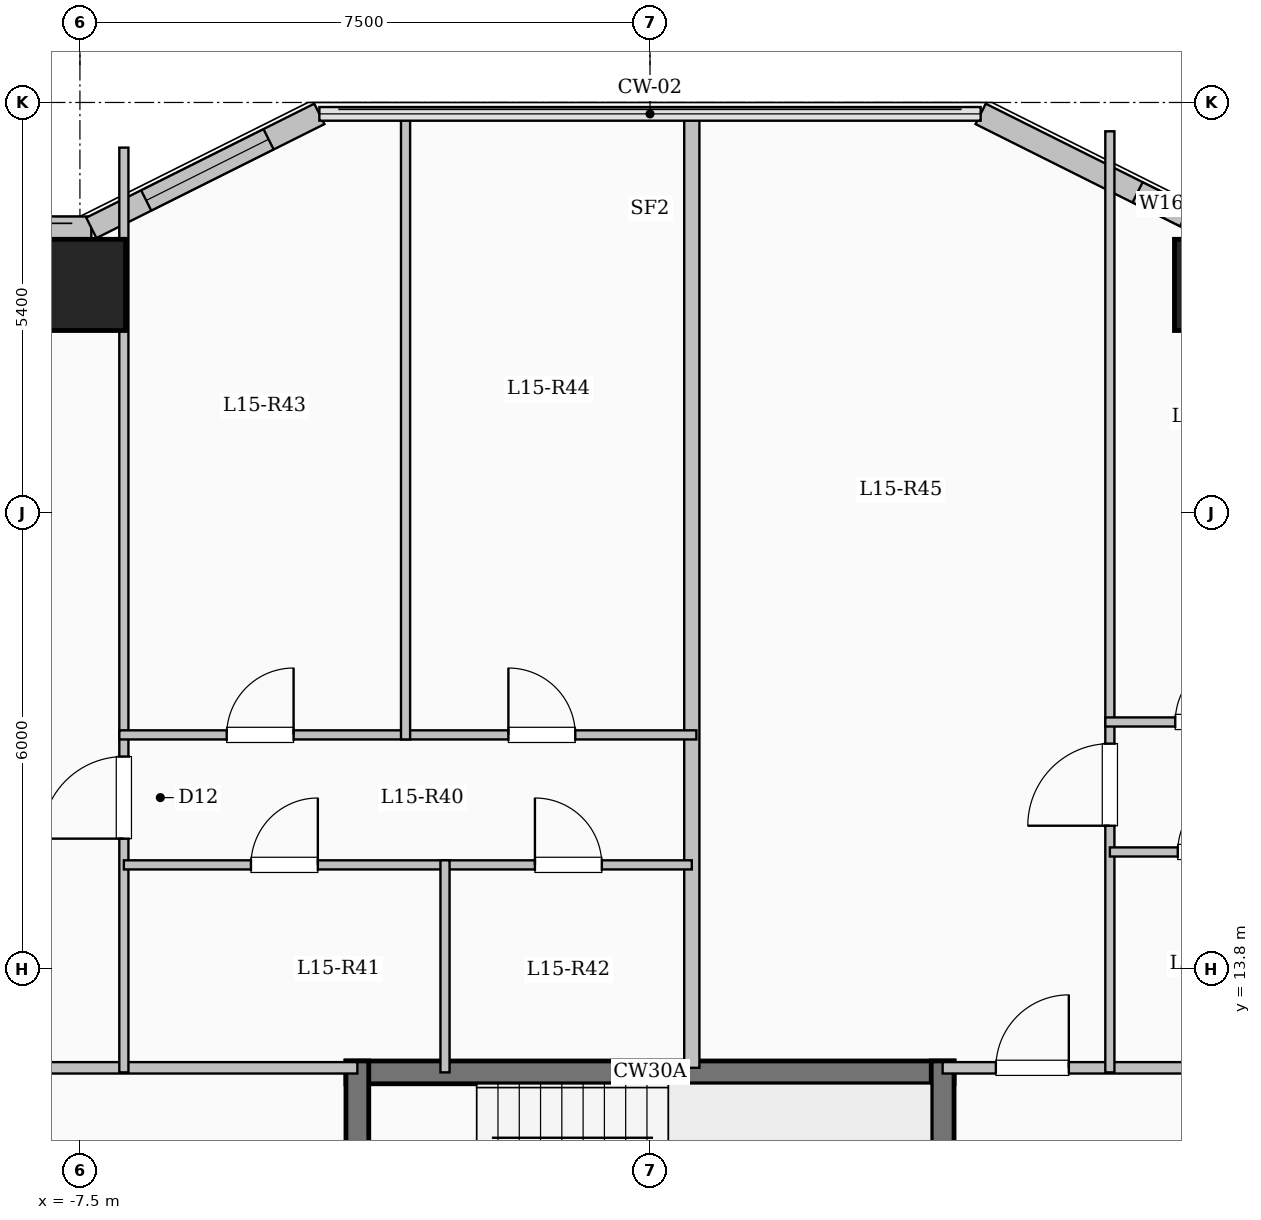
"""IFC4 building model, lengths in metres.
Left out: names, types, materials, properties, quantities, classifications, styles, units other than length and angle.
Written with IfcOpenShell. Run it as: python <this file> out.ifc"""

import sys

from ifc_helpers import new_model, si_unit, direction, frame, frame_2d, origin, origin_2d, place, context, subcontext, project, spatial, rectangle, extrude, element, fill, save


model = new_model("IFC4")
c1 = context("Model", 3, precision=1e-05, world=origin(), true_north=direction((0.0, 1.0)))
c2 = subcontext(c1, "Body", "Model", "MODEL_VIEW")
j1 = project(units=[si_unit("LENGTHUNIT", "METRE"), si_unit("PLANEANGLEUNIT", "RADIAN")], contexts=[c1])
p1 = place(None, origin())
s1 = spatial("IfcSite", under=j1, at=p1, CompositionType="ELEMENT")
p2 = place(p1, origin())
s2 = spatial("IfcBuilding", under=s1, at=p2, CompositionType="ELEMENT")
p3 = place(p2, frame((0.0, 0.0, 57.5)))
s3 = spatial("IfcBuildingStorey", under=s2, at=p3, CompositionType="ELEMENT", Elevation=57.5)
for number, where, z_axis, x_axis in (
    (1, (-7.5, 22.8, 0.0), (0.0, 0.0, 1.0), (1.0, 0.0, 0.0)),
    (2, (7.5, 22.8, 0.0), (0.0, 0.0, 1.0), (1.0, 0.0, 0.0)),
):
    element("IfcColumn", number, at=place(p3, frame(where, z_axis=z_axis, x_axis=x_axis)), inside=s3, PredefinedType="COLUMN", context=c2, shape_type="SweptSolid", body=[
        extrude(rectangle(XDim=1.2, YDim=1.2, at=origin_2d()), origin(), (0.0, 0.0, 1.0), 3.35),
    ])
p4 = place(p3, frame((-22.65, 23.55, 0.0), z_axis=(0.0, 0.0, 1.0), x_axis=(1.0, 0.0, 0.0)))
e3 = element("IfcWall", 3, at=p4, inside=s3, PredefinedType="SOLIDWALL", context=c2, shape_type="SweptSolid", body=[
    extrude(rectangle(XDim=15.3, YDim=0.3, at=frame_2d((7.65, 0.0))), origin(), (0.0, 0.0, 1.0), 3.1),
])
p5 = place(p4, frame((1.81, 0.0, 0.9)))
e4 = element("IfcOpeningElement", 4, at=p5, cuts=e3, PredefinedType="OPENING", context=c2, shape_type="SweptSolid", body=[
    extrude(rectangle(XDim=2.4, YDim=1.8, at=frame_2d((1.2, 0.9))), frame((0.0, 0.16, 0.0), z_axis=(0.0, -1.0, 0.0), x_axis=(1.0, 0.0, 0.0)), (0.0, 0.0, 1.0), 0.32),
])
p6 = place(p4, frame((7.427, 0.0, 0.9)))
e5 = element("IfcOpeningElement", 5, at=p6, cuts=e3, PredefinedType="OPENING", context=c2, shape_type="SweptSolid", body=[
    extrude(rectangle(XDim=1.8, YDim=1.65, at=frame_2d((0.9, 0.825))), frame((0.0, 0.16, 0.0), z_axis=(0.0, -1.0, 0.0), x_axis=(1.0, 0.0, 0.0)), (0.0, 0.0, 1.0), 0.32),
])
p7 = place(p4, frame((11.868, 0.0, 0.9)))
e6 = element("IfcOpeningElement", 6, at=p7, cuts=e3, PredefinedType="OPENING", context=c2, shape_type="SweptSolid", body=[
    extrude(rectangle(XDim=2.4, YDim=1.8, at=frame_2d((1.2, 0.9))), frame((0.0, 0.16, 0.0), z_axis=(0.0, -1.0, 0.0), x_axis=(1.0, 0.0, 0.0)), (0.0, 0.0, 1.0), 0.32),
])
p8 = place(p3, frame((-7.35, 23.55, 0.0), z_axis=(0.0, 0.0, 1.0), x_axis=(0.894427191, 0.4472135955, 0.0)))
e7 = element("IfcWall", 7, at=p8, inside=s3, PredefinedType="SOLIDWALL", context=c2, shape_type="SweptSolid", body=[
    extrude(rectangle(XDim=3.354, YDim=0.3, at=frame_2d((1.677, 0.0))), origin(), (0.0, 0.0, 1.0), 3.1),
])
p9 = place(p8, frame((0.807, 0.0, 0.9)))
e8 = element("IfcOpeningElement", 8, at=p9, cuts=e7, PredefinedType="OPENING", context=c2, shape_type="SweptSolid", body=[
    extrude(rectangle(XDim=1.8, YDim=1.65, at=frame_2d((0.9, 0.825))), frame((0.0, 0.16, 0.0), z_axis=(0.0, -1.0, 0.0), x_axis=(1.0, 0.0, 0.0)), (0.0, 0.0, 1.0), 0.32),
])
p10 = place(p3, frame((4.35, 25.05, 0.0), z_axis=(0.0, 0.0, 1.0), x_axis=(0.894427191, -0.4472135955, 0.0)))
e9 = element("IfcWall", 9, at=p10, inside=s3, PredefinedType="SOLIDWALL", context=c2, shape_type="SweptSolid", body=[
    extrude(rectangle(XDim=3.354, YDim=0.3, at=frame_2d((1.677, 0.0))), origin(), (0.0, 0.0, 1.0), 3.1),
])
p11 = place(p10, frame((2.308, 0.0, 0.95)))
e10 = element("IfcOpeningElement", 10, at=p11, cuts=e9, PredefinedType="OPENING", context=c2, shape_type="SweptSolid", body=[
    extrude(rectangle(XDim=0.7, YDim=1.5, at=frame_2d((0.35, 0.75))), frame((0.0, 0.16, 0.0), z_axis=(0.0, -1.0, 0.0), x_axis=(1.0, 0.0, 0.0)), (0.0, 0.0, 1.0), 0.32),
])
p12 = place(p3, frame((-4.0, 12.44, 0.0), z_axis=(0.0, 0.0, 1.0), x_axis=(1.0, 0.0, 0.0)))
e11 = element("IfcWall", 11, at=p12, inside=s3, PredefinedType="SHEAR", context=c2, shape_type="SweptSolid", body=[
    extrude(rectangle(XDim=8.0, YDim=0.3, at=frame_2d((4.0, 0.0))), origin(), (0.0, 0.0, 1.0), 3.35),
])
for number, where, z_axis, x_axis in (
    (12, (-3.85, 9.0, 0.0), (0.0, 0.0, 1.0), (0.0, 1.0, 0.0)),
    (13, (3.85, 9.0, 0.0), (0.0, 0.0, 1.0), (0.0, 1.0, 0.0)),
):
    element("IfcWall", number, at=place(p3, frame(where, z_axis=z_axis, x_axis=x_axis)), inside=s3, PredefinedType="SHEAR", context=c2, shape_type="SweptSolid", body=[
        extrude(rectangle(XDim=3.59, YDim=0.3, at=frame_2d((1.795, 0.0))), origin(), (0.0, 0.0, 1.0), 3.35),
    ])
p13 = place(p3, frame((-22.55, 12.5, 0.0), z_axis=(0.0, 0.0, 1.0), x_axis=(1.0, 0.0, 0.0)))
e14 = element("IfcWall", 14, at=p13, inside=s3, PredefinedType="PARTITIONING", context=c2, shape_type="SweptSolid", body=[
    extrude(rectangle(XDim=18.7, YDim=0.15, at=frame_2d((9.35, 0.0))), origin(), (0.0, 0.0, 1.0), 3.1),
])
p14 = place(p13, frame((0.7, 0.0, 0.0)))
e15 = element("IfcOpeningElement", 15, at=p14, cuts=e14, PredefinedType="OPENING", context=c2, shape_type="SweptSolid", body=[
    extrude(rectangle(XDim=0.96, YDim=2.15, at=frame_2d((0.48, 1.075))), frame((0.0, 0.085, 0.0), z_axis=(0.0, -1.0, 0.0), x_axis=(1.0, 0.0, 0.0)), (0.0, 0.0, 1.0), 0.17),
])
p15 = place(p13, frame((11.326, 0.0, 0.0)))
e16 = element("IfcOpeningElement", 16, at=p15, cuts=e14, PredefinedType="OPENING", context=c2, shape_type="SweptSolid", body=[
    extrude(rectangle(XDim=0.96, YDim=2.15, at=frame_2d((0.48, 1.075))), frame((0.0, 0.085, 0.0), z_axis=(0.0, -1.0, 0.0), x_axis=(1.0, 0.0, 0.0)), (0.0, 0.0, 1.0), 0.17),
])
p16 = place(p3, frame((3.85, 12.5, 0.0), z_axis=(0.0, 0.0, 1.0), x_axis=(1.0, 0.0, 0.0)))
e17 = element("IfcWall", 17, at=p16, inside=s3, PredefinedType="PARTITIONING", context=c2, shape_type="SweptSolid", body=[
    extrude(rectangle(XDim=18.7, YDim=0.15, at=frame_2d((9.35, 0.0))), origin(), (0.0, 0.0, 1.0), 3.1),
])
p17 = place(p16, frame((0.7, 0.0, 0.0)))
e18 = element("IfcOpeningElement", 18, at=p17, cuts=e17, PredefinedType="OPENING", context=c2, shape_type="SweptSolid", body=[
    extrude(rectangle(XDim=0.96, YDim=2.15, at=frame_2d((0.48, 1.075))), frame((0.0, 0.085, 0.0), z_axis=(0.0, -1.0, 0.0), x_axis=(1.0, 0.0, 0.0)), (0.0, 0.0, 1.0), 0.17),
])
p18 = place(p16, frame((8.4, 0.0, 0.0)))
e19 = element("IfcOpeningElement", 19, at=p18, cuts=e17, PredefinedType="OPENING", context=c2, shape_type="SweptSolid", body=[
    extrude(rectangle(XDim=0.96, YDim=2.15, at=frame_2d((0.48, 1.075))), frame((0.0, 0.085, 0.0), z_axis=(0.0, -1.0, 0.0), x_axis=(1.0, 0.0, 0.0)), (0.0, 0.0, 1.0), 0.17),
])
p19 = place(p3, frame((0.55, 12.5, 0.0), z_axis=(0.0, 0.0, 1.0), x_axis=(0.0, 1.0, 0.0)))
e20 = element("IfcWall", 20, at=p19, inside=s3, PredefinedType="SOLIDWALL", context=c2, shape_type="SweptSolid", body=[
    extrude(rectangle(XDim=12.58, YDim=0.2, at=frame_2d((6.29, 0.0))), origin(), (0.0, 0.0, 1.0), 3.1),
])
p20 = place(p3, frame((-6.922, 12.44, 0.0), z_axis=(0.0, 0.0, 1.0), x_axis=(0.0, 1.0, 0.0)))
e21 = element("IfcWall", 21, at=p20, inside=s3, PredefinedType="PARTITIONING", context=c2, shape_type="SweptSolid", body=[
    extrude(rectangle(XDim=12.166, YDim=0.12, at=frame_2d((6.083, 0.0))), origin(), (0.0, 0.0, 1.0), 3.1),
])
p21 = place(p20, frame((3.075, 0.0, 0.0)))
e22 = element("IfcOpeningElement", 22, at=p21, cuts=e21, PredefinedType="OPENING", context=c2, shape_type="SweptSolid", body=[
    extrude(rectangle(XDim=1.08, YDim=2.15, at=frame_2d((0.54, 1.075))), frame((0.0, 0.07, 0.0), z_axis=(0.0, -1.0, 0.0), x_axis=(1.0, 0.0, 0.0)), (0.0, 0.0, 1.0), 0.14),
])
p22 = place(p3, frame((-6.922, 15.17, 0.0), z_axis=(0.0, 0.0, 1.0), x_axis=(1.0, 0.0, 0.0)))
e23 = element("IfcWall", 23, at=p22, inside=s3, PredefinedType="PARTITIONING", context=c2, shape_type="SweptSolid", body=[
    extrude(rectangle(XDim=4.225, YDim=0.12, at=frame_2d((2.113, 0.0))), origin(), (0.0, 0.0, 1.0), 3.1),
])
p23 = place(p22, frame((1.672, 0.0, 0.0)))
e24 = element("IfcOpeningElement", 24, at=p23, cuts=e23, PredefinedType="OPENING", context=c2, shape_type="SweptSolid", body=[
    extrude(rectangle(XDim=0.88, YDim=2.1, at=frame_2d((0.44, 1.05))), frame((0.0, 0.07, 0.0), z_axis=(0.0, -1.0, 0.0), x_axis=(1.0, 0.0, 0.0)), (0.0, 0.0, 1.0), 0.14),
])
p24 = place(p3, frame((-2.697, 15.17, 0.0), z_axis=(0.0, 0.0, 1.0), x_axis=(1.0, 0.0, 0.0)))
e25 = element("IfcWall", 25, at=p24, inside=s3, PredefinedType="PARTITIONING", context=c2, shape_type="SweptSolid", body=[
    extrude(rectangle(XDim=3.247, YDim=0.12, at=frame_2d((1.624, 0.0))), origin(), (0.0, 0.0, 1.0), 3.1),
])
p25 = place(p24, frame((1.183, 0.0, 0.0)))
e26 = element("IfcOpeningElement", 26, at=p25, cuts=e25, PredefinedType="OPENING", context=c2, shape_type="SweptSolid", body=[
    extrude(rectangle(XDim=0.88, YDim=2.1, at=frame_2d((0.44, 1.05))), frame((0.0, 0.07, 0.0), z_axis=(0.0, -1.0, 0.0), x_axis=(1.0, 0.0, 0.0)), (0.0, 0.0, 1.0), 0.14),
])
p26 = place(p3, frame((-6.982, 16.88, 0.0), z_axis=(0.0, 0.0, 1.0), x_axis=(1.0, 0.0, 0.0)))
e27 = element("IfcWall", 27, at=p26, inside=s3, PredefinedType="PARTITIONING", context=c2, shape_type="SweptSolid", body=[
    extrude(rectangle(XDim=7.592, YDim=0.12, at=frame_2d((3.796, 0.0))), origin(), (0.0, 0.0, 1.0), 3.1),
])
p27 = place(p26, frame((1.413, 0.0, 0.0)))
e28 = element("IfcOpeningElement", 28, at=p27, cuts=e27, PredefinedType="OPENING", context=c2, shape_type="SweptSolid", body=[
    extrude(rectangle(XDim=0.88, YDim=2.1, at=frame_2d((0.44, 1.05))), frame((0.0, 0.07, 0.0), z_axis=(0.0, -1.0, 0.0), x_axis=(1.0, 0.0, 0.0)), (0.0, 0.0, 1.0), 0.14),
])
p28 = place(p26, frame((5.119, 0.0, 0.0)))
e29 = element("IfcOpeningElement", 29, at=p28, cuts=e27, PredefinedType="OPENING", context=c2, shape_type="SweptSolid", body=[
    extrude(rectangle(XDim=0.88, YDim=2.1, at=frame_2d((0.44, 1.05))), frame((0.0, 0.07, 0.0), z_axis=(0.0, -1.0, 0.0), x_axis=(1.0, 0.0, 0.0)), (0.0, 0.0, 1.0), 0.14),
])
p29 = place(p3, frame((-2.697, 12.44, 0.0), z_axis=(0.0, 0.0, 1.0), x_axis=(0.0, 1.0, 0.0)))
e30 = element("IfcWall", 30, at=p29, inside=s3, PredefinedType="PARTITIONING", context=c2, shape_type="SweptSolid", body=[
    extrude(rectangle(XDim=2.79, YDim=0.12, at=frame_2d((1.395, 0.0))), origin(), (0.0, 0.0, 1.0), 3.1),
])
p30 = place(p3, frame((-3.216, 16.82, 0.0), z_axis=(0.0, 0.0, 1.0), x_axis=(0.0, 1.0, 0.0)))
e31 = element("IfcWall", 31, at=p30, inside=s3, PredefinedType="PARTITIONING", context=c2, shape_type="SweptSolid", body=[
    extrude(rectangle(XDim=8.26, YDim=0.12, at=frame_2d((4.13, 0.0))), origin(), (0.0, 0.0, 1.0), 3.1),
])
p31 = place(p3, frame((6.05, 12.44, 0.0), z_axis=(0.0, 0.0, 1.0), x_axis=(0.0, 1.0, 0.0)))
e32 = element("IfcWall", 32, at=p31, inside=s3, PredefinedType="PARTITIONING", context=c2, shape_type="SweptSolid", body=[
    extrude(rectangle(XDim=12.381, YDim=0.12, at=frame_2d((6.19, 0.0))), origin(), (0.0, 0.0, 1.0), 3.1),
])
p32 = place(p31, frame((3.245, 0.0, 0.0)))
e33 = element("IfcOpeningElement", 33, at=p32, cuts=e32, PredefinedType="OPENING", context=c2, shape_type="SweptSolid", body=[
    extrude(rectangle(XDim=1.08, YDim=2.15, at=frame_2d((0.54, 1.075))), frame((0.0, 0.07, 0.0), z_axis=(0.0, -1.0, 0.0), x_axis=(1.0, 0.0, 0.0)), (0.0, 0.0, 1.0), 0.14),
])
p33 = place(p3, frame((6.05, 15.34, 0.0), z_axis=(0.0, 0.0, 1.0), x_axis=(1.0, 0.0, 0.0)))
e34 = element("IfcWall", 34, at=p33, inside=s3, PredefinedType="PARTITIONING", context=c2, shape_type="SweptSolid", body=[
    extrude(rectangle(XDim=2.666, YDim=0.12, at=frame_2d((1.333, 0.0))), origin(), (0.0, 0.0, 1.0), 3.1),
])
p34 = place(p33, frame((0.893, 0.0, 0.0)))
e35 = element("IfcOpeningElement", 35, at=p34, cuts=e34, PredefinedType="OPENING", context=c2, shape_type="SweptSolid", body=[
    extrude(rectangle(XDim=0.88, YDim=2.1, at=frame_2d((0.44, 1.05))), frame((0.0, 0.07, 0.0), z_axis=(0.0, -1.0, 0.0), x_axis=(1.0, 0.0, 0.0)), (0.0, 0.0, 1.0), 0.14),
])
p35 = place(p3, frame((5.99, 17.05, 0.0), z_axis=(0.0, 0.0, 1.0), x_axis=(1.0, 0.0, 0.0)))
e36 = element("IfcWall", 36, at=p35, inside=s3, PredefinedType="PARTITIONING", context=c2, shape_type="SweptSolid", body=[
    extrude(rectangle(XDim=5.62, YDim=0.12, at=frame_2d((2.81, 0.0))), origin(), (0.0, 0.0, 1.0), 3.1),
])
p36 = place(p35, frame((0.92, 0.0, 0.0)))
e37 = element("IfcOpeningElement", 37, at=p36, cuts=e36, PredefinedType="OPENING", context=c2, shape_type="SweptSolid", body=[
    extrude(rectangle(XDim=0.88, YDim=2.1, at=frame_2d((0.44, 1.05))), frame((0.0, 0.07, 0.0), z_axis=(0.0, -1.0, 0.0), x_axis=(1.0, 0.0, 0.0)), (0.0, 0.0, 1.0), 0.14),
])
p37 = place(p35, frame((3.64, 0.0, 0.0)))
e38 = element("IfcOpeningElement", 38, at=p37, cuts=e36, PredefinedType="OPENING", context=c2, shape_type="SweptSolid", body=[
    extrude(rectangle(XDim=0.88, YDim=2.1, at=frame_2d((0.44, 1.05))), frame((0.0, 0.07, 0.0), z_axis=(0.0, -1.0, 0.0), x_axis=(1.0, 0.0, 0.0)), (0.0, 0.0, 1.0), 0.14),
])
p38 = place(p9, origin())
e39 = element("IfcWindow", 39, at=p38, inside=s3, PartitioningType="SINGLE_PANEL", PredefinedType="WINDOW", context=c2, shape_type="SweptSolid", body=[
    extrude(rectangle(XDim=1.8, YDim=1.65, at=frame_2d((0.9, 0.825))), frame((0.0, 0.03, 0.0), z_axis=(0.0, -1.0, 0.0), x_axis=(1.0, 0.0, 0.0)), (0.0, 0.0, 1.0), 0.06),
])
fill(e8, e39)
p39 = place(p11, origin())
e40 = element("IfcWindow", 40, at=p39, inside=s3, PartitioningType="SINGLE_PANEL", PredefinedType="WINDOW", context=c2, shape_type="SweptSolid", body=[
    extrude(rectangle(XDim=0.7, YDim=1.5, at=frame_2d((0.35, 0.75))), frame((0.0, 0.03, 0.0), z_axis=(0.0, -1.0, 0.0), x_axis=(1.0, 0.0, 0.0)), (0.0, 0.0, 1.0), 0.06),
])
fill(e10, e40)
p40 = place(p21, origin())
e41 = element("IfcDoor", 41, at=p40, inside=s3, OperationType="SINGLE_SWING_LEFT", PredefinedType="DOOR", context=c2, shape_type="SweptSolid", body=[
    extrude(rectangle(XDim=1.08, YDim=2.15, at=frame_2d((0.54, 1.075))), frame((0.0, 0.025, 0.0), z_axis=(0.0, -1.0, 0.0), x_axis=(1.0, 0.0, 0.0)), (0.0, 0.0, 1.0), 0.05),
])
fill(e22, e41)
p41 = place(p23, origin())
e42 = element("IfcDoor", 42, at=p41, inside=s3, OperationType="SINGLE_SWING_RIGHT", PredefinedType="DOOR", context=c2, shape_type="SweptSolid", body=[
    extrude(rectangle(XDim=0.88, YDim=2.1, at=frame_2d((0.44, 1.05))), frame((0.0, 0.025, 0.0), z_axis=(0.0, -1.0, 0.0), x_axis=(1.0, 0.0, 0.0)), (0.0, 0.0, 1.0), 0.05),
])
fill(e24, e42)
p42 = place(p25, origin())
e43 = element("IfcDoor", 43, at=p42, inside=s3, OperationType="SINGLE_SWING_LEFT", PredefinedType="DOOR", context=c2, shape_type="SweptSolid", body=[
    extrude(rectangle(XDim=0.88, YDim=2.1, at=frame_2d((0.44, 1.05))), frame((0.0, 0.025, 0.0), z_axis=(0.0, -1.0, 0.0), x_axis=(1.0, 0.0, 0.0)), (0.0, 0.0, 1.0), 0.05),
])
fill(e26, e43)
p43 = place(p27, origin())
e44 = element("IfcDoor", 44, at=p43, inside=s3, OperationType="SINGLE_SWING_RIGHT", PredefinedType="DOOR", context=c2, shape_type="SweptSolid", body=[
    extrude(rectangle(XDim=0.88, YDim=2.1, at=frame_2d((0.44, 1.05))), frame((0.0, 0.025, 0.0), z_axis=(0.0, -1.0, 0.0), x_axis=(1.0, 0.0, 0.0)), (0.0, 0.0, 1.0), 0.05),
])
fill(e28, e44)
p44 = place(p28, origin())
e45 = element("IfcDoor", 45, at=p44, inside=s3, OperationType="SINGLE_SWING_LEFT", PredefinedType="DOOR", context=c2, shape_type="SweptSolid", body=[
    extrude(rectangle(XDim=0.88, YDim=2.1, at=frame_2d((0.44, 1.05))), frame((0.0, 0.025, 0.0), z_axis=(0.0, -1.0, 0.0), x_axis=(1.0, 0.0, 0.0)), (0.0, 0.0, 1.0), 0.05),
])
fill(e29, e45)
p45 = place(p17, origin())
e46 = element("IfcDoor", 46, at=p45, inside=s3, OperationType="SINGLE_SWING_RIGHT", PredefinedType="DOOR", context=c2, shape_type="SweptSolid", body=[
    extrude(rectangle(XDim=0.96, YDim=2.15, at=frame_2d((0.48, 1.075))), frame((0.0, 0.025, 0.0), z_axis=(0.0, -1.0, 0.0), x_axis=(1.0, 0.0, 0.0)), (0.0, 0.0, 1.0), 0.05),
])
fill(e18, e46)
p46 = place(p32, origin())
e47 = element("IfcDoor", 47, at=p46, inside=s3, OperationType="SINGLE_SWING_LEFT", PredefinedType="DOOR", context=c2, shape_type="SweptSolid", body=[
    extrude(rectangle(XDim=1.08, YDim=2.15, at=frame_2d((0.54, 1.075))), frame((0.0, 0.025, 0.0), z_axis=(0.0, -1.0, 0.0), x_axis=(1.0, 0.0, 0.0)), (0.0, 0.0, 1.0), 0.05),
])
fill(e33, e47)
p47 = place(p34, origin())
e48 = element("IfcDoor", 48, at=p47, inside=s3, OperationType="SINGLE_SWING_RIGHT", PredefinedType="DOOR", context=c2, shape_type="SweptSolid", body=[
    extrude(rectangle(XDim=0.88, YDim=2.1, at=frame_2d((0.44, 1.05))), frame((0.0, 0.025, 0.0), z_axis=(0.0, -1.0, 0.0), x_axis=(1.0, 0.0, 0.0)), (0.0, 0.0, 1.0), 0.05),
])
fill(e35, e48)
p48 = place(p36, origin())
e49 = element("IfcDoor", 49, at=p48, inside=s3, OperationType="SINGLE_SWING_RIGHT", PredefinedType="DOOR", context=c2, shape_type="SweptSolid", body=[
    extrude(rectangle(XDim=0.88, YDim=2.1, at=frame_2d((0.44, 1.05))), frame((0.0, 0.025, 0.0), z_axis=(0.0, -1.0, 0.0), x_axis=(1.0, 0.0, 0.0)), (0.0, 0.0, 1.0), 0.05),
])
fill(e37, e49)
save(model, sys.argv[1])
